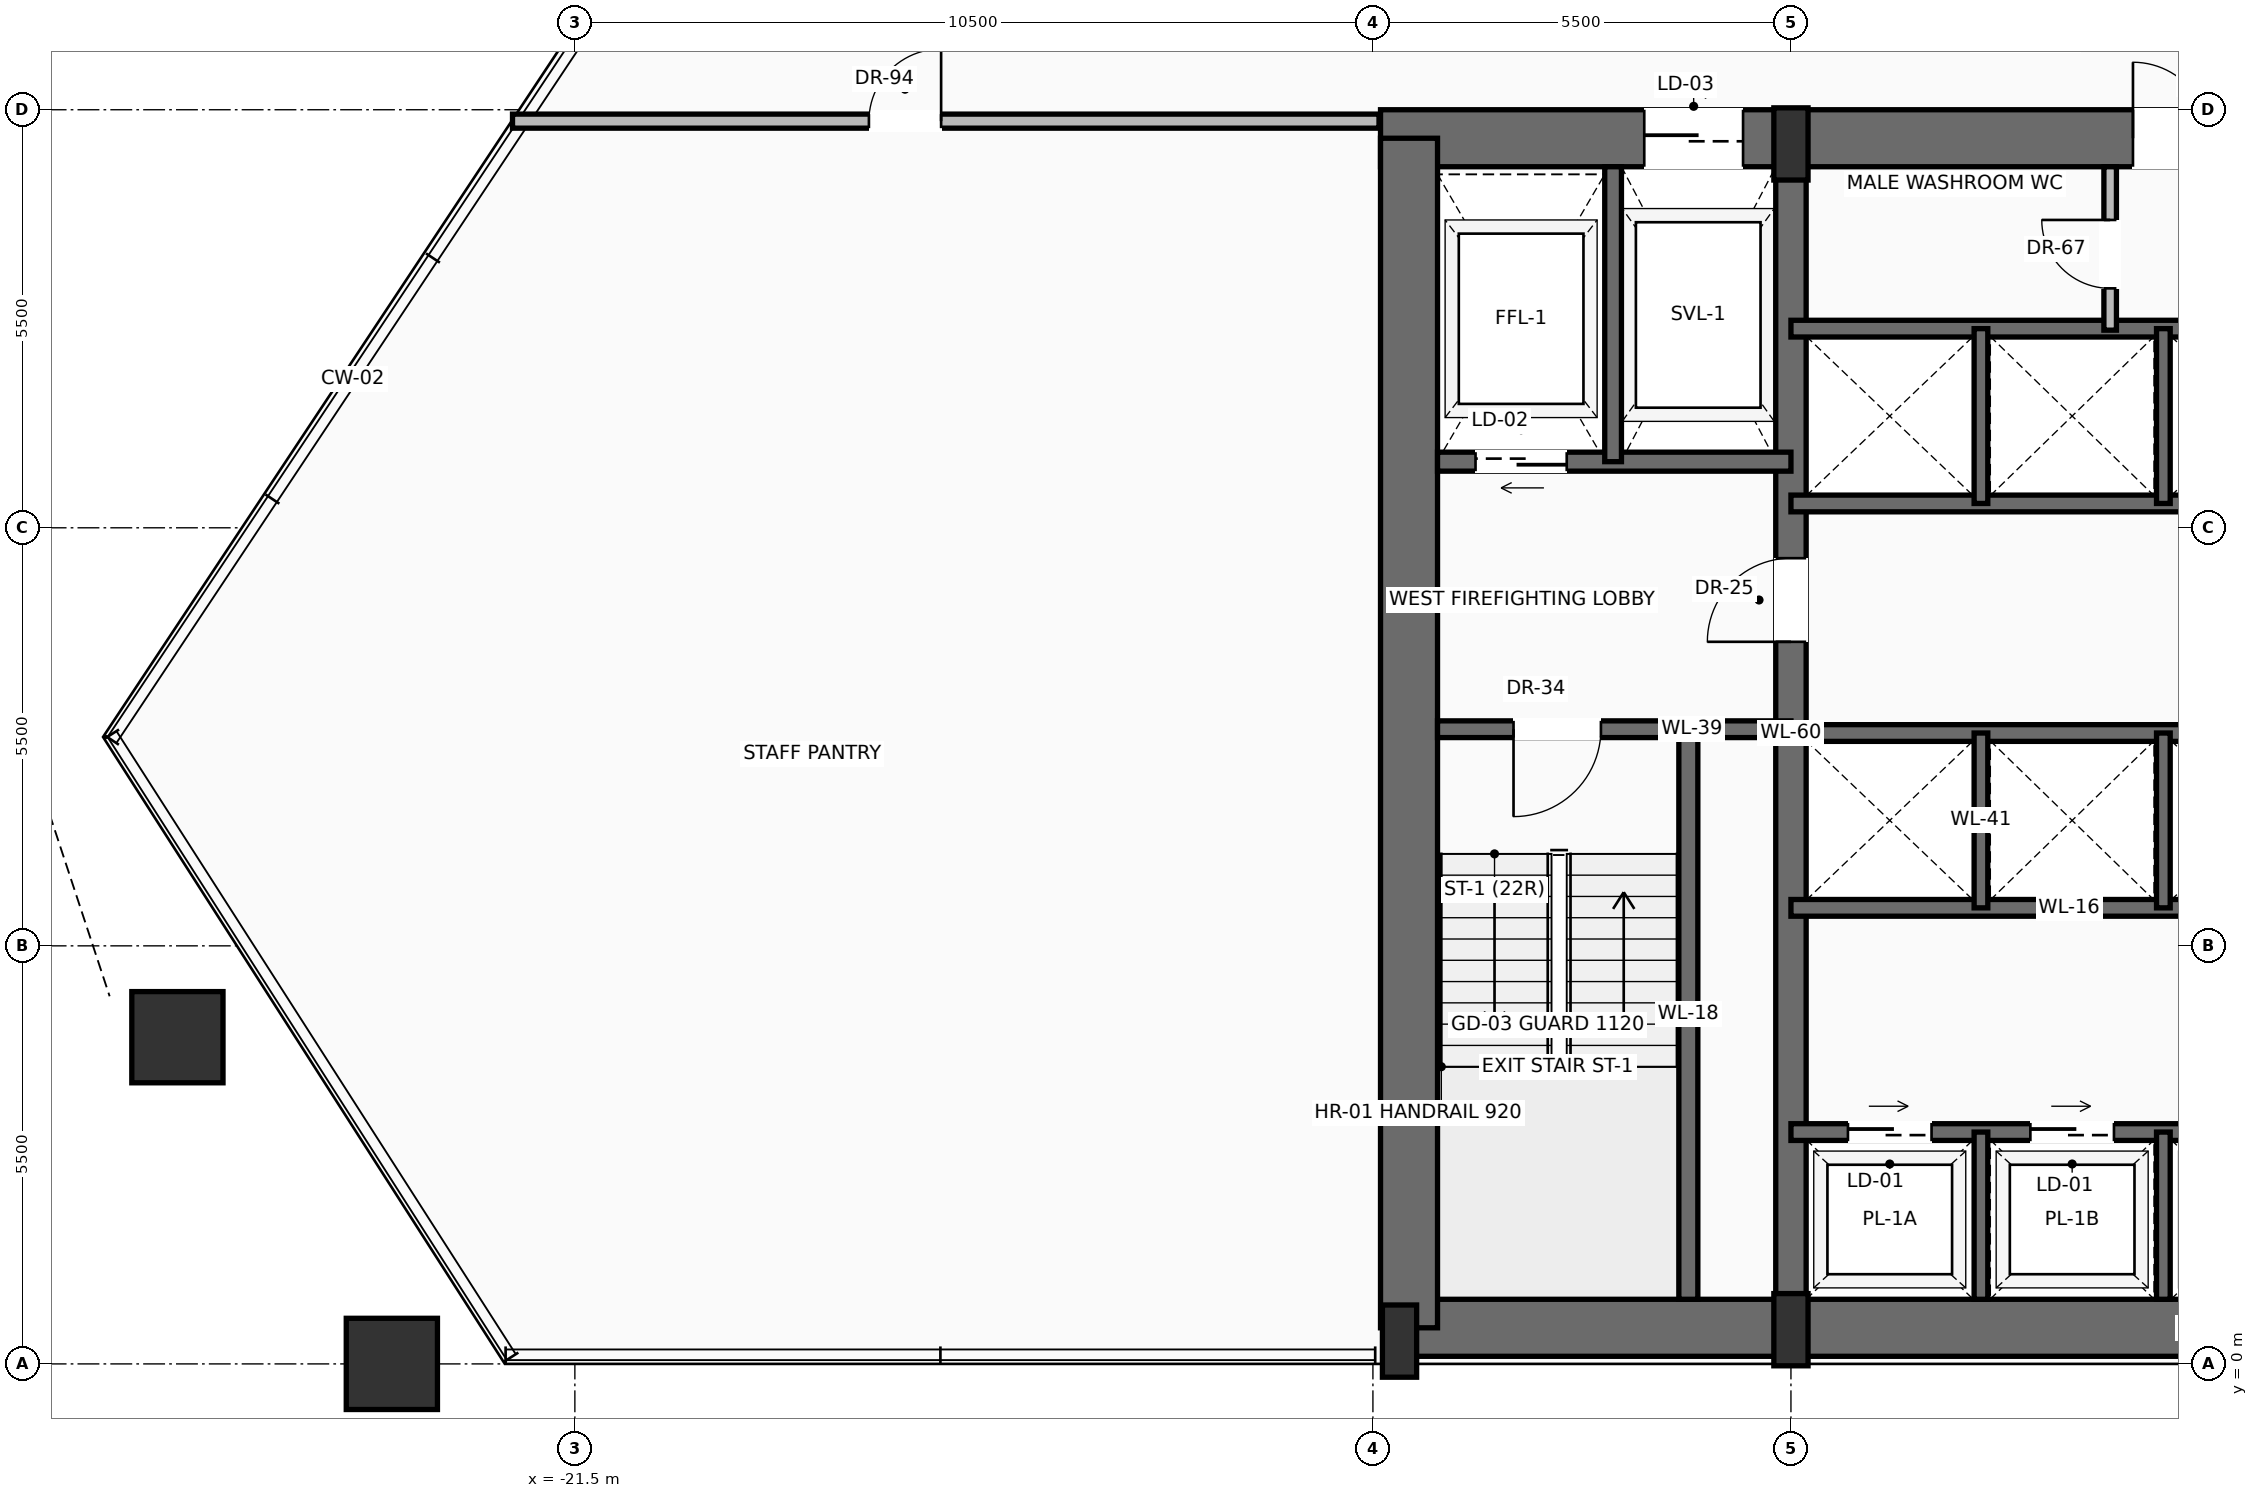
"""IFC4 building model, lengths in metres.
Left out: names, types, materials, properties, quantities, classifications, styles, units other than length and angle.
Written with IfcOpenShell. Run it as: python <this file> out.ifc"""

import sys

from ifc_helpers import new_model, si_unit, direction, frame, frame_2d, origin, origin_2d, place, context, subcontext, project, spatial, rectangle, hollow_rectangle, extrude, source, transform, mapped, element, fill, save


model = new_model("IFC4")
c1 = context("Model", 3, precision=1e-05, world=origin(), true_north=direction((0.0, 1.0)))
c2 = subcontext(c1, "Body", "Model", "MODEL_VIEW")
j1 = project(units=[si_unit("LENGTHUNIT", "METRE"), si_unit("PLANEANGLEUNIT", "RADIAN")], contexts=[c1])
p1 = place(None, origin())
s1 = spatial("IfcSite", under=j1, at=p1, CompositionType="ELEMENT")
p2 = place(p1, origin())
s2 = spatial("IfcBuilding", under=s1, at=p2, CompositionType="ELEMENT")
p3 = place(p2, frame((0.0, 0.0, 117.3)))
s3 = spatial("IfcBuildingStorey", under=s2, at=p3, CompositionType="ELEMENT", Elevation=117.3)
p4 = place(p3, frame((-10.65, 0.475, 0.0), z_axis=(0.0, 0.0, 1.0), x_axis=(1.0, 0.0, 0.0)))
e1 = element("IfcWall", 1, at=p4, inside=s3, PredefinedType="SHEAR", context=c2, shape_type="SweptSolid", body=[
    extrude(rectangle(XDim=21.3, YDim=0.75, at=frame_2d((10.65, 0.0))), origin(), (0.0, 0.0, 1.0), 3.42),
])
p5 = place(p3, frame((-10.9, 16.125, 0.0), z_axis=(0.0, 0.0, 1.0), x_axis=(1.0, 0.0, 0.0)))
e2 = element("IfcWall", 2, at=p5, inside=s3, PredefinedType="SHEAR", context=c2, shape_type="SweptSolid", body=[
    extrude(rectangle(XDim=21.8, YDim=0.75, at=frame_2d((10.9, 0.0))), origin(), (0.0, 0.0, 1.0), 3.42),
])
p6 = place(p5, frame((3.47, 0.0, 0.0)))
e3 = element("IfcOpeningElement", 3, at=p6, cuts=e2, PredefinedType="OPENING", context=c2, shape_type="SweptSolid", body=[
    extrude(rectangle(XDim=1.3, YDim=2.3, at=frame_2d((0.65, 1.15))), frame((0.0, 0.385, 0.0), z_axis=(0.0, -1.0, 0.0), x_axis=(1.0, 0.0, 0.0)), (0.0, 0.0, 1.0), 0.77),
])
p7 = place(p5, frame((9.9, 0.0, 0.0)))
e4 = element("IfcOpeningElement", 4, at=p7, cuts=e2, PredefinedType="OPENING", context=c2, shape_type="SweptSolid", body=[
    extrude(rectangle(XDim=2.0, YDim=2.4, at=frame_2d((1.0, 1.2))), frame((0.0, 0.385, 0.0), z_axis=(0.0, -1.0, 0.0), x_axis=(1.0, 0.0, 0.0)), (0.0, 0.0, 1.0), 0.77),
])
p8 = place(p3, frame((-10.525, 0.475, 0.0), z_axis=(0.0, 0.0, 1.0), x_axis=(0.0, 1.0, 0.0)))
e5 = element("IfcWall", 5, at=p8, inside=s3, PredefinedType="SHEAR", context=c2, shape_type="SweptSolid", body=[
    extrude(rectangle(XDim=15.65, YDim=0.75, at=frame_2d((7.825, 0.0))), origin(), (0.0, 0.0, 1.0), 3.42),
])
p9 = place(p3, frame((-5.5, 0.475, 0.0), z_axis=(0.0, 0.0, 1.0), x_axis=(0.0, 1.0, 0.0)))
e6 = element("IfcWall", 6, at=p9, inside=s3, PredefinedType="SHEAR", context=c2, shape_type="SweptSolid", body=[
    extrude(rectangle(XDim=15.65, YDim=0.4, at=frame_2d((7.825, 0.0))), origin(), (0.0, 0.0, 1.0), 3.42),
])
p10 = place(p9, frame((9.025, 0.0, 0.0)))
e7 = element("IfcOpeningElement", 7, at=p10, cuts=e6, PredefinedType="OPENING", context=c2, shape_type="SweptSolid", body=[
    extrude(rectangle(XDim=1.1, YDim=2.2, at=frame_2d((0.55, 1.1))), frame((0.0, 0.21, 0.0), z_axis=(0.0, -1.0, 0.0), x_axis=(1.0, 0.0, 0.0)), (0.0, 0.0, 1.0), 0.42),
])
m1 = source(origin(), c2, "Body", "SweptSolid", [
    extrude(rectangle(XDim=0.45, YDim=0.95, at=origin_2d()), origin(), (0.0, 0.0, 1.0), 3.7),
])
for number, where, z_axis, x_axis in (
    (8, (-10.65, 0.3, 0.0), (0.0, 0.0, 1.0), (1.0, 0.0, 0.0)),
    (9, (-5.5, 0.45, 0.0), (0.0, 0.0, 1.0), (1.0, 0.0, 0.0)),
    (10, (-5.5, 16.05, 0.0), (0.0, 0.0, 1.0), (1.0, 0.0, 0.0)),
):
    element("IfcColumn", number, at=place(p3, frame(where, z_axis=z_axis, x_axis=x_axis)), inside=s3, PredefinedType="PILASTER", context=c2, shape_type="MappedRepresentation", body=[
        mapped(m1, transform((0.0, 0.0, 0.0), scale=1.0)),
    ])
m2 = source(origin(), c2, "Body", "SweptSolid", [
    extrude(hollow_rectangle(XDim=1.2, YDim=1.2, WallThickness=0.06, at=origin_2d()), origin(), (0.0, 0.0, 1.0), 3.691),
])
p11 = place(p3, frame((-23.908, 0.0, 0.004), z_axis=(-0.01256597649, 0.0, 0.999921045), x_axis=(0.0, -1.0, 0.0)))
e11 = element("IfcColumn", 11, at=p11, inside=s3, PredefinedType="COLUMN", context=c2, shape_type="MappedRepresentation", body=[
    mapped(m2, transform((0.0, 0.0, 0.0), scale=1.0)),
])
m3 = source(origin(), c2, "Body", "SweptSolid", [
    extrude(hollow_rectangle(XDim=1.2, YDim=1.2, WallThickness=0.06, at=origin_2d()), origin(), (0.0, 0.0, 1.0), 3.692),
])
p12 = place(p3, frame((-26.729, 4.298, 0.004), z_axis=(-0.000925861215, -0.016467103041, 0.999863979398), x_axis=(0.998423118025, -0.056136239568, 0.0)))
e12 = element("IfcColumn", 12, at=p12, inside=s3, PredefinedType="COLUMN", context=c2, shape_type="MappedRepresentation", body=[
    mapped(m3, transform((0.0, 0.0, 0.0), scale=1.0)),
])
p13 = place(p3, frame((-6.85, 0.85, 0.0), z_axis=(0.0, 0.0, 1.0), x_axis=(0.0, 1.0, 0.0)))
e13 = element("IfcWall", 13, at=p13, inside=s3, PredefinedType="SOLIDWALL", context=c2, shape_type="SweptSolid", body=[
    extrude(rectangle(XDim=7.5, YDim=0.25, at=frame_2d((3.75, 0.0))), origin(), (0.0, 0.0, 1.0), 3.42),
])
p14 = place(p3, frame((-5.5, 8.35, 0.0), z_axis=(0.0, 0.0, 1.0), x_axis=(-1.0, 0.0, 0.0)))
e14 = element("IfcWall", 14, at=p14, inside=s3, PredefinedType="SOLIDWALL", context=c2, shape_type="SweptSolid", body=[
    extrude(rectangle(XDim=4.65, YDim=0.22, at=frame_2d((2.325, 0.0))), origin(), (0.0, 0.0, 1.0), 3.42),
])
p15 = place(p14, frame((2.5, 0.0, 0.0)))
e15 = element("IfcOpeningElement", 15, at=p15, cuts=e14, PredefinedType="OPENING", context=c2, shape_type="SweptSolid", body=[
    extrude(rectangle(XDim=1.15, YDim=2.2, at=frame_2d((0.575, 1.1))), frame((0.0, 0.12, 0.0), z_axis=(0.0, -1.0, 0.0), x_axis=(1.0, 0.0, 0.0)), (0.0, 0.0, 1.0), 0.24),
])
p16 = place(p3, frame((-5.5, 11.87, 0.0), z_axis=(0.0, 0.0, 1.0), x_axis=(-1.0, 0.0, 0.0)))
e16 = element("IfcWall", 16, at=p16, inside=s3, PredefinedType="SOLIDWALL", context=c2, shape_type="SweptSolid", body=[
    extrude(rectangle(XDim=4.65, YDim=0.25, at=frame_2d((2.325, 0.0))), origin(), (0.0, 0.0, 1.0), 3.42),
])
p17 = place(p16, frame((2.95, 0.0, 0.0)))
e17 = element("IfcOpeningElement", 17, at=p17, cuts=e16, PredefinedType="OPENING", context=c2, shape_type="SweptSolid", body=[
    extrude(rectangle(XDim=1.2, YDim=2.25, at=frame_2d((0.6, 1.125))), frame((0.0, 0.135, 0.0), z_axis=(0.0, -1.0, 0.0), x_axis=(1.0, 0.0, 0.0)), (0.0, 0.0, 1.0), 0.27),
])
p18 = place(p3, frame((-7.84, 11.87, 0.0), z_axis=(0.0, 0.0, 1.0), x_axis=(0.0, 1.0, 0.0)))
e18 = element("IfcWall", 18, at=p18, inside=s3, PredefinedType="SOLIDWALL", context=c2, shape_type="SweptSolid", body=[
    extrude(rectangle(XDim=3.88, YDim=0.22, at=frame_2d((1.94, 0.0))), origin(), (0.0, 0.0, 1.0), 3.42),
])
p19 = place(p3, frame((-5.5, 3.05, 0.0), z_axis=(0.0, 0.0, 1.0), x_axis=(1.0, 0.0, 0.0)))
e19 = element("IfcWall", 19, at=p19, inside=s3, PredefinedType="SOLIDWALL", context=c2, shape_type="SweptSolid", body=[
    extrude(rectangle(XDim=7.32, YDim=0.22, at=frame_2d((3.66, 0.0))), origin(), (0.0, 0.0, 1.0), 3.42),
])
p20 = place(p19, frame((0.75, 0.0, 0.0)))
e20 = element("IfcOpeningElement", 20, at=p20, cuts=e19, PredefinedType="OPENING", context=c2, shape_type="SweptSolid", body=[
    extrude(rectangle(XDim=1.1, YDim=2.2, at=frame_2d((0.55, 1.1))), frame((0.0, 0.12, 0.0), z_axis=(0.0, -1.0, 0.0), x_axis=(1.0, 0.0, 0.0)), (0.0, 0.0, 1.0), 0.24),
])
p21 = place(p19, frame((3.15, 0.0, 0.0)))
e21 = element("IfcOpeningElement", 21, at=p21, cuts=e19, PredefinedType="OPENING", context=c2, shape_type="SweptSolid", body=[
    extrude(rectangle(XDim=1.1, YDim=2.2, at=frame_2d((0.55, 1.1))), frame((0.0, 0.12, 0.0), z_axis=(0.0, -1.0, 0.0), x_axis=(1.0, 0.0, 0.0)), (0.0, 0.0, 1.0), 0.24),
])
p22 = place(p19, frame((5.55, 0.0, 0.0)))
e22 = element("IfcOpeningElement", 22, at=p22, cuts=e19, PredefinedType="OPENING", context=c2, shape_type="SweptSolid", body=[
    extrude(rectangle(XDim=1.1, YDim=2.2, at=frame_2d((0.55, 1.1))), frame((0.0, 0.12, 0.0), z_axis=(0.0, -1.0, 0.0), x_axis=(1.0, 0.0, 0.0)), (0.0, 0.0, 1.0), 0.24),
])
for number, where, z_axis, x_axis in (
    (23, (-3.0, 0.85, 0.0), (0.0, 0.0, 1.0), (0.0, 1.0, 0.0)),
    (24, (-0.6, 0.85, 0.0), (0.0, 0.0, 1.0), (0.0, 1.0, 0.0)),
):
    element("IfcWall", number, at=place(p3, frame(where, z_axis=z_axis, x_axis=x_axis)), inside=s3, PredefinedType="SOLIDWALL", context=c2, shape_type="SweptSolid", body=[
        extrude(rectangle(XDim=2.2, YDim=0.18, at=frame_2d((1.1, 0.0))), origin(), (0.0, 0.0, 1.0), 3.42),
    ])
for number, where, z_axis, x_axis in (
    (25, (-5.5, 6.0, 0.0), (0.0, 0.0, 1.0), (1.0, 0.0, 0.0)),
    (26, (-5.5, 8.3, 0.0), (0.0, 0.0, 1.0), (1.0, 0.0, 0.0)),
):
    element("IfcWall", number, at=place(p3, frame(where, z_axis=z_axis, x_axis=x_axis)), inside=s3, PredefinedType="SOLIDWALL", context=c2, shape_type="SweptSolid", body=[
        extrude(rectangle(XDim=7.32, YDim=0.22, at=frame_2d((3.66, 0.0))), origin(), (0.0, 0.0, 1.0), 3.42),
    ])
for number, where, z_axis, x_axis in (
    (27, (-3.0, 6.0, 0.0), (0.0, 0.0, 1.0), (0.0, 1.0, 0.0)),
    (28, (-0.6, 6.0, 0.0), (0.0, 0.0, 1.0), (0.0, 1.0, 0.0)),
):
    element("IfcWall", number, at=place(p3, frame(where, z_axis=z_axis, x_axis=x_axis)), inside=s3, PredefinedType="SOLIDWALL", context=c2, shape_type="SweptSolid", body=[
        extrude(rectangle(XDim=2.3, YDim=0.18, at=frame_2d((1.15, 0.0))), origin(), (0.0, 0.0, 1.0), 3.42),
    ])
for number, where, z_axis, x_axis in (
    (29, (-5.5, 11.32, 0.0), (0.0, 0.0, 1.0), (1.0, 0.0, 0.0)),
    (30, (-5.5, 13.62, 0.0), (0.0, 0.0, 1.0), (1.0, 0.0, 0.0)),
):
    element("IfcWall", number, at=place(p3, frame(where, z_axis=z_axis, x_axis=x_axis)), inside=s3, PredefinedType="SOLIDWALL", context=c2, shape_type="SweptSolid", body=[
        extrude(rectangle(XDim=7.32, YDim=0.22, at=frame_2d((3.66, 0.0))), origin(), (0.0, 0.0, 1.0), 3.42),
    ])
for number, where, z_axis, x_axis in (
    (31, (-3.0, 11.32, 0.0), (0.0, 0.0, 1.0), (0.0, 1.0, 0.0)),
    (32, (-0.6, 11.32, 0.0), (0.0, 0.0, 1.0), (0.0, 1.0, 0.0)),
):
    element("IfcWall", number, at=place(p3, frame(where, z_axis=z_axis, x_axis=x_axis)), inside=s3, PredefinedType="SOLIDWALL", context=c2, shape_type="SweptSolid", body=[
        extrude(rectangle(XDim=2.3, YDim=0.18, at=frame_2d((1.15, 0.0))), origin(), (0.0, 0.0, 1.0), 3.42),
    ])
p23 = place(p3, frame((-1.3, 13.6, 0.0), z_axis=(0.0, 0.0, 1.0), x_axis=(0.0, 1.0, 0.0)))
e33 = element("IfcWall", 33, at=p23, inside=s3, PredefinedType="PARTITIONING", context=c2, shape_type="SweptSolid", body=[
    extrude(rectangle(XDim=2.15, YDim=0.165, at=frame_2d((1.075, 0.0))), origin(), (0.0, 0.0, 1.0), 3.412),
])
p24 = place(p23, frame((0.55, 0.0, 0.0)))
e34 = element("IfcOpeningElement", 34, at=p24, cuts=e33, PredefinedType="OPENING", context=c2, shape_type="SweptSolid", body=[
    extrude(rectangle(XDim=0.9, YDim=2.1, at=frame_2d((0.45, 1.05))), frame((0.0, 0.093, 0.0), z_axis=(0.0, -1.0, 0.0), x_axis=(1.0, 0.0, 0.0)), (0.0, 0.0, 1.0), 0.185),
])
p25 = place(p3, frame((-22.321, 16.35, 0.0), z_axis=(0.0, 0.0, 1.0), x_axis=(1.0, 0.0, 0.0)))
e35 = element("IfcWall", 35, at=p25, inside=s3, PredefinedType="PARTITIONING", context=c2, shape_type="SweptSolid", body=[
    extrude(rectangle(XDim=11.401, YDim=0.185, at=frame_2d((5.7, 0.0))), origin(), (0.0, 0.0, 1.0), 2.717),
])
p26 = place(p25, frame((4.689, 0.0, 0.0)))
e36 = element("IfcOpeningElement", 36, at=p26, cuts=e35, PredefinedType="OPENING", context=c2, shape_type="SweptSolid", body=[
    extrude(rectangle(XDim=0.95, YDim=2.2, at=frame_2d((0.475, 1.1))), frame((0.0, 0.103, 0.0), z_axis=(0.0, -1.0, 0.0), x_axis=(1.0, 0.0, 0.0)), (0.0, 0.0, 1.0), 0.205),
])
m4 = source(origin(), c2, "Body", "SweptSolid", [
    extrude(rectangle(XDim=1.15, YDim=2.2, at=frame_2d((0.575, 1.1))), frame((0.0, 0.025, 0.0), z_axis=(0.0, -1.0, 0.0), x_axis=(1.0, 0.0, 0.0)), (0.0, 0.0, 1.0), 0.05),
])
p27 = place(p15, origin())
e37 = element("IfcDoor", 37, at=p27, inside=s3, OperationType="SINGLE_SWING_RIGHT", PredefinedType="DOOR", context=c2, shape_type="MappedRepresentation", body=[
    mapped(m4, transform((0.0, 0.0, 0.0), scale=1.0)),
])
fill(e15, e37)
m5 = source(origin(), c2, "Body", "SweptSolid", [
    extrude(rectangle(XDim=1.1, YDim=2.2, at=frame_2d((0.55, 1.1))), frame((0.0, 0.025, 0.0), z_axis=(0.0, -1.0, 0.0), x_axis=(1.0, 0.0, 0.0)), (0.0, 0.0, 1.0), 0.05),
])
p28 = place(p10, origin())
e38 = element("IfcDoor", 38, at=p28, inside=s3, OperationType="SINGLE_SWING_LEFT", PredefinedType="DOOR", context=c2, shape_type="MappedRepresentation", body=[
    mapped(m5, transform((0.0, 0.0, 0.0), scale=1.0)),
])
fill(e7, e38)
m6 = source(origin(), c2, "Body", "SweptSolid", [
    extrude(rectangle(XDim=1.2, YDim=2.25, at=frame_2d((0.6, 1.125))), frame((0.0, 0.025, 0.0), z_axis=(0.0, -1.0, 0.0), x_axis=(1.0, 0.0, 0.0)), (0.0, 0.0, 1.0), 0.05),
])
p29 = place(p17, origin())
e39 = element("IfcDoor", 39, at=p29, inside=s3, OperationType="SLIDING_TO_LEFT", PredefinedType="DOOR", context=c2, shape_type="MappedRepresentation", body=[
    mapped(m6, transform((0.0, 0.0, 0.0), scale=1.0)),
])
fill(e17, e39)
m7 = source(origin(), c2, "Body", "SweptSolid", [
    extrude(rectangle(XDim=1.3, YDim=2.3, at=frame_2d((0.65, 1.15))), frame((0.0, 0.025, 0.0), z_axis=(0.0, -1.0, 0.0), x_axis=(1.0, 0.0, 0.0)), (0.0, 0.0, 1.0), 0.05),
])
p30 = place(p6, origin())
e40 = element("IfcDoor", 40, at=p30, inside=s3, OperationType="SLIDING_TO_RIGHT", PredefinedType="DOOR", context=c2, shape_type="MappedRepresentation", body=[
    mapped(m7, transform((0.0, 0.0, 0.0), scale=1.0)),
])
fill(e3, e40)
m8 = source(origin(), c2, "Body", "SweptSolid", [
    extrude(rectangle(XDim=2.0, YDim=2.4, at=frame_2d((1.0, 1.2))), frame((0.0, 0.025, 0.0), z_axis=(0.0, -1.0, 0.0), x_axis=(1.0, 0.0, 0.0)), (0.0, 0.0, 1.0), 0.05),
])
p31 = place(p7, origin())
e41 = element("IfcDoor", 41, at=p31, inside=s3, OperationType="DOUBLE_DOOR_SINGLE_SWING", PredefinedType="DOOR", context=c2, shape_type="MappedRepresentation", body=[
    mapped(m8, transform((0.0, 0.0, 0.0), scale=1.0)),
])
fill(e4, e41)
m9 = source(origin(), c2, "Body", "SweptSolid", [
    extrude(rectangle(XDim=1.1, YDim=2.2, at=frame_2d((0.55, 1.1))), frame((0.0, 0.025, 0.0), z_axis=(0.0, -1.0, 0.0), x_axis=(1.0, 0.0, 0.0)), (0.0, 0.0, 1.0), 0.05),
])
p32 = place(p20, origin())
e42 = element("IfcDoor", 42, at=p32, inside=s3, OperationType="SLIDING_TO_RIGHT", PredefinedType="DOOR", context=c2, shape_type="MappedRepresentation", body=[
    mapped(m9, transform((0.0, 0.0, 0.0), scale=1.0)),
])
fill(e20, e42)
p33 = place(p21, origin())
e43 = element("IfcDoor", 43, at=p33, inside=s3, OperationType="SLIDING_TO_RIGHT", PredefinedType="DOOR", context=c2, shape_type="MappedRepresentation", body=[
    mapped(m9, transform((0.0, 0.0, 0.0), scale=1.0)),
])
fill(e21, e43)
m10 = source(origin(), c2, "Body", "SweptSolid", [
    extrude(rectangle(XDim=0.9, YDim=2.1, at=frame_2d((0.45, 1.05))), frame((0.0, 0.025, 0.0), z_axis=(0.0, -1.0, 0.0), x_axis=(1.0, 0.0, 0.0)), (0.0, 0.0, 1.0), 0.05),
])
p34 = place(p24, origin())
e44 = element("IfcDoor", 44, at=p34, inside=s3, OperationType="SINGLE_SWING_RIGHT", PredefinedType="DOOR", context=c2, shape_type="MappedRepresentation", body=[
    mapped(m10, transform((0.0, 0.0, 0.0), scale=1.0)),
])
fill(e34, e44)
m11 = source(origin(), c2, "Body", "SweptSolid", [
    extrude(rectangle(XDim=0.95, YDim=2.2, at=frame_2d((0.475, 1.1))), frame((0.0, 0.025, 0.0), z_axis=(0.0, -1.0, 0.0), x_axis=(1.0, 0.0, 0.0)), (0.0, 0.0, 1.0), 0.05),
])
p35 = place(p26, origin())
e45 = element("IfcDoor", 45, at=p35, inside=s3, OperationType="SINGLE_SWING_RIGHT", PredefinedType="DOOR", context=c2, shape_type="MappedRepresentation", body=[
    mapped(m11, transform((0.0, 0.0, 0.0), scale=1.0)),
])
fill(e36, e45)
save(model, sys.argv[1])
